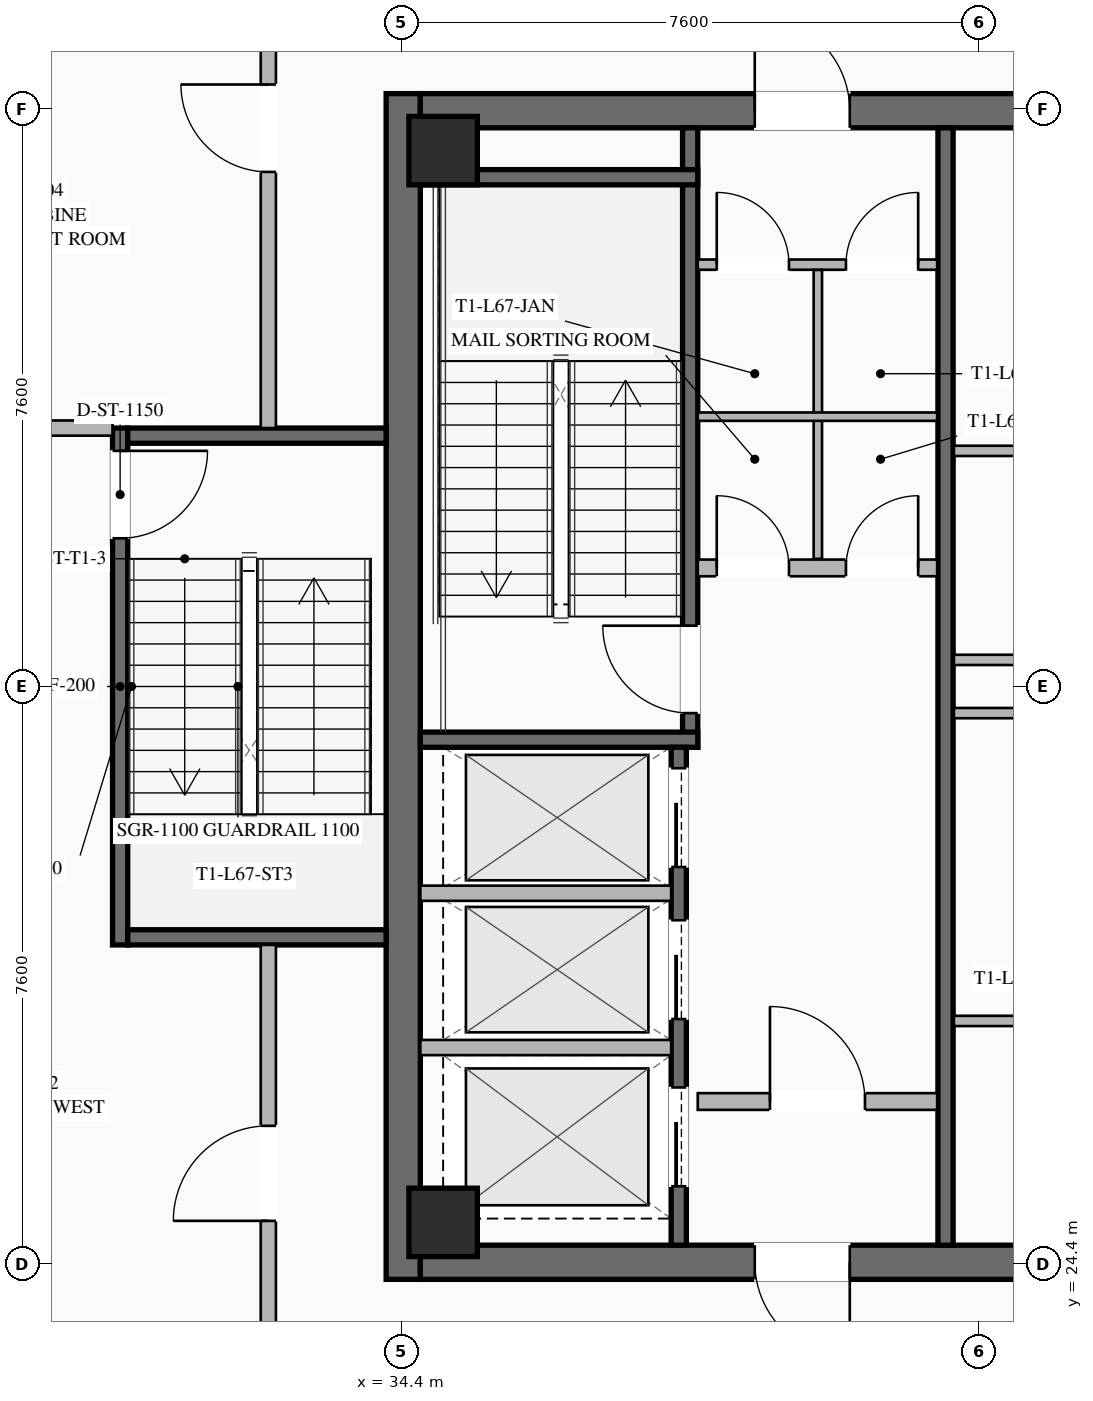
"""IFC4 building model, lengths in metres.
Left out: names, types, materials, properties, quantities, classifications, styles, units other than length and angle.
Written with IfcOpenShell. Run it as: python <this file> out.ifc"""

import sys

from ifc_helpers import new_model, si_unit, direction, frame, frame_2d, origin, origin_2d, place, context, subcontext, project, spatial, rectangle, hollow_rectangle, extrude, element, fill, save


model = new_model("IFC4")
c1 = context("Model", 3, precision=1e-05, world=origin(), true_north=direction((0.0, 1.0)))
c2 = subcontext(c1, "Body", "Model", "MODEL_VIEW")
j1 = project(units=[si_unit("LENGTHUNIT", "METRE"), si_unit("PLANEANGLEUNIT", "RADIAN")], contexts=[c1])
p1 = place(None, origin())
s1 = spatial("IfcSite", under=j1, at=p1, CompositionType="ELEMENT")
p2 = place(p1, origin())
s2 = spatial("IfcBuilding", under=s1, at=p2, CompositionType="ELEMENT")
p3 = place(p2, frame((0.0, 0.0, 246.8)))
s3 = spatial("IfcBuildingStorey", under=s2, at=p3, CompositionType="ELEMENT", Elevation=246.8)
p4 = place(p3, frame((34.425, 24.2, 0.0), z_axis=(0.0, 0.0, 1.0), x_axis=(0.0, 1.0, 0.0)))
e1 = element("IfcWall", 1, at=p4, inside=s3, PredefinedType="SHEAR", context=c2, shape_type="SweptSolid", body=[
    extrude(rectangle(XDim=15.6, YDim=0.45, at=frame_2d((7.8, 0.0))), origin(), (0.0, 0.0, 1.0), 4.6),
])
p5 = place(p3, frame((49.35, 24.425, 0.0), z_axis=(0.0, 0.0, 1.0), x_axis=(-1.0, 0.0, 0.0)))
e2 = element("IfcWall", 2, at=p5, inside=s3, PredefinedType="SHEAR", context=c2, shape_type="SweptSolid", body=[
    extrude(rectangle(XDim=14.7, YDim=0.45, at=frame_2d((7.35, 0.0))), origin(), (0.0, 0.0, 1.0), 4.6),
])
p6 = place(p5, frame((9.05, 0.0, 0.0)))
e3 = element("IfcOpeningElement", 3, at=p6, cuts=e2, PredefinedType="OPENING", context=c2, shape_type="SweptSolid", body=[
    extrude(rectangle(XDim=1.25, YDim=2.25, at=frame_2d((0.625, 1.125))), frame((0.0, 0.235, 0.0), z_axis=(0.0, -1.0, 0.0), x_axis=(1.0, 0.0, 0.0)), (0.0, 0.0, 1.0), 0.47),
])
p7 = place(p5, frame((4.0, 0.0, 0.0)))
e4 = element("IfcOpeningElement", 4, at=p7, cuts=e2, PredefinedType="OPENING", context=c2, shape_type="SweptSolid", body=[
    extrude(rectangle(XDim=1.25, YDim=2.25, at=frame_2d((0.625, 1.125))), frame((0.0, 0.235, 0.0), z_axis=(0.0, -1.0, 0.0), x_axis=(1.0, 0.0, 0.0)), (0.0, 0.0, 1.0), 0.47),
])
p8 = place(p3, frame((34.65, 39.575, 0.0), z_axis=(0.0, 0.0, 1.0), x_axis=(1.0, 0.0, 0.0)))
e5 = element("IfcWall", 5, at=p8, inside=s3, PredefinedType="SHEAR", context=c2, shape_type="SweptSolid", body=[
    extrude(rectangle(XDim=14.7, YDim=0.45, at=frame_2d((7.35, 0.0))), origin(), (0.0, 0.0, 1.0), 4.6),
])
p9 = place(p8, frame((4.4, 0.0, 0.0)))
e6 = element("IfcOpeningElement", 6, at=p9, cuts=e5, PredefinedType="OPENING", context=c2, shape_type="SweptSolid", body=[
    extrude(rectangle(XDim=1.25, YDim=2.25, at=frame_2d((0.625, 1.125))), frame((0.0, 0.235, 0.0), z_axis=(0.0, -1.0, 0.0), x_axis=(1.0, 0.0, 0.0)), (0.0, 0.0, 1.0), 0.47),
])
p10 = place(p8, frame((9.45, 0.0, 0.0)))
e7 = element("IfcOpeningElement", 7, at=p10, cuts=e5, PredefinedType="OPENING", context=c2, shape_type="SweptSolid", body=[
    extrude(rectangle(XDim=1.25, YDim=2.25, at=frame_2d((0.625, 1.125))), frame((0.0, 0.235, 0.0), z_axis=(0.0, -1.0, 0.0), x_axis=(1.0, 0.0, 0.0)), (0.0, 0.0, 1.0), 0.47),
])
for number, where, z_axis, x_axis in (
    (8, (34.95, 24.95, 0.0), (0.0, 0.0, 1.0), (1.0, 0.0, 0.0)),
    (9, (34.95, 39.05, 0.0), (0.0, 0.0, 1.0), (1.0, 0.0, 0.0)),
):
    element("IfcColumn", number, at=place(p3, frame(where, z_axis=z_axis, x_axis=x_axis)), inside=s3, PredefinedType="COLUMN", context=c2, shape_type="SweptSolid", body=[
        extrude(hollow_rectangle(XDim=0.9, YDim=0.9, WallThickness=0.04, at=origin_2d()), origin(), (0.0, 0.0, 1.0), 4.38),
    ])
p11 = place(p3, frame((38.2, 31.2, 0.0), z_axis=(0.0, 0.0, 1.0), x_axis=(0.0, 1.0, 0.0)))
e10 = element("IfcWall", 10, at=p11, inside=s3, PredefinedType="SHEAR", context=c2, shape_type="SweptSolid", body=[
    extrude(rectangle(XDim=8.15, YDim=0.2, at=frame_2d((4.075, 0.0))), origin(), (0.0, 0.0, 1.0), 4.38),
])
p12 = place(p11, frame((0.45, 0.0, 0.0)))
e11 = element("IfcOpeningElement", 11, at=p12, cuts=e10, PredefinedType="OPENING", context=c2, shape_type="SweptSolid", body=[
    extrude(rectangle(XDim=1.15, YDim=2.2, at=frame_2d((0.575, 1.1))), frame((0.0, 0.11, 0.0), z_axis=(0.0, -1.0, 0.0), x_axis=(1.0, 0.0, 0.0)), (0.0, 0.0, 1.0), 0.22),
])
for number, where, z_axis, x_axis in (
    (12, (34.65, 31.3, 0.0), (0.0, 0.0, 1.0), (1.0, 0.0, 0.0)),
    (13, (34.65, 38.7, 0.0), (0.0, 0.0, 1.0), (1.0, 0.0, 0.0)),
):
    element("IfcWall", number, at=place(p3, frame(where, z_axis=z_axis, x_axis=x_axis)), inside=s3, PredefinedType="SHEAR", context=c2, shape_type="SweptSolid", body=[
        extrude(rectangle(XDim=3.65, YDim=0.2, at=frame_2d((1.825, 0.0))), origin(), (0.0, 0.0, 1.0), 4.38),
    ])
p13 = place(p3, frame((41.56, 24.65, 0.0), z_axis=(0.0, 0.0, 1.0), x_axis=(0.0, 1.0, 0.0)))
e14 = element("IfcWall", 14, at=p13, inside=s3, PredefinedType="SHEAR", context=c2, shape_type="SweptSolid", body=[
    extrude(rectangle(XDim=14.7, YDim=0.2, at=frame_2d((7.35, 0.0))), origin(), (0.0, 0.0, 1.0), 4.38),
])
p14 = place(p3, frame((38.3, 33.56, 0.0), z_axis=(0.0, 0.0, 1.0), x_axis=(1.0, 0.0, 0.0)))
e15 = element("IfcWall", 15, at=p14, inside=s3, PredefinedType="SOLIDWALL", context=c2, shape_type="SweptSolid", body=[
    extrude(rectangle(XDim=3.15, YDim=0.22, at=frame_2d((1.575, 0.0))), origin(), (0.0, 0.0, 1.0), 3.491),
])
p15 = place(p14, frame((0.25, 0.0, 0.0)))
e16 = element("IfcOpeningElement", 16, at=p15, cuts=e15, PredefinedType="OPENING", context=c2, shape_type="SweptSolid", body=[
    extrude(rectangle(XDim=0.95, YDim=2.05, at=frame_2d((0.475, 1.025))), frame((0.0, 0.12, 0.0), z_axis=(0.0, -1.0, 0.0), x_axis=(1.0, 0.0, 0.0)), (0.0, 0.0, 1.0), 0.24),
])
p16 = place(p14, frame((1.95, 0.0, 0.0)))
e17 = element("IfcOpeningElement", 17, at=p16, cuts=e15, PredefinedType="OPENING", context=c2, shape_type="SweptSolid", body=[
    extrude(rectangle(XDim=0.95, YDim=2.05, at=frame_2d((0.475, 1.025))), frame((0.0, 0.12, 0.0), z_axis=(0.0, -1.0, 0.0), x_axis=(1.0, 0.0, 0.0)), (0.0, 0.0, 1.0), 0.24),
])
p17 = place(p3, frame((38.3, 26.54, 0.0), z_axis=(0.0, 0.0, 1.0), x_axis=(1.0, 0.0, 0.0)))
e18 = element("IfcWall", 18, at=p17, inside=s3, PredefinedType="SOLIDWALL", context=c2, shape_type="SweptSolid", body=[
    extrude(rectangle(XDim=3.15, YDim=0.22, at=frame_2d((1.575, 0.0))), origin(), (0.0, 0.0, 1.0), 3.491),
])
p18 = place(p17, frame((0.95, 0.0, 0.0)))
e19 = element("IfcOpeningElement", 19, at=p18, cuts=e18, PredefinedType="OPENING", context=c2, shape_type="SweptSolid", body=[
    extrude(rectangle(XDim=1.25, YDim=2.25, at=frame_2d((0.625, 1.125))), frame((0.0, 0.12, 0.0), z_axis=(0.0, -1.0, 0.0), x_axis=(1.0, 0.0, 0.0)), (0.0, 0.0, 1.0), 0.24),
])
p19 = place(p3, frame((38.05, 24.65, 0.0), z_axis=(0.0, 0.0, 1.0), x_axis=(0.0, 1.0, 0.0)))
e20 = element("IfcWall", 20, at=p19, inside=s3, PredefinedType="SHEAR", context=c2, shape_type="SweptSolid", body=[
    extrude(rectangle(XDim=6.55, YDim=0.2, at=frame_2d((3.275, 0.0))), origin(), (0.0, 0.0, 1.0), 4.38),
])
p20 = place(p19, frame((4.975, 0.0, 0.0)))
e21 = element("IfcOpeningElement", 21, at=p20, cuts=e20, PredefinedType="OPENING", context=c2, shape_type="SweptSolid", body=[
    extrude(rectangle(XDim=1.3, YDim=2.25, at=frame_2d((0.65, 1.125))), frame((0.0, 0.11, 0.0), z_axis=(0.0, -1.0, 0.0), x_axis=(1.0, 0.0, 0.0)), (0.0, 0.0, 1.0), 0.22),
])
p21 = place(p19, frame((2.975, 0.0, 0.0)))
e22 = element("IfcOpeningElement", 22, at=p21, cuts=e20, PredefinedType="OPENING", context=c2, shape_type="SweptSolid", body=[
    extrude(rectangle(XDim=1.3, YDim=2.25, at=frame_2d((0.65, 1.125))), frame((0.0, 0.11, 0.0), z_axis=(0.0, -1.0, 0.0), x_axis=(1.0, 0.0, 0.0)), (0.0, 0.0, 1.0), 0.22),
])
p22 = place(p19, frame((0.775, 0.0, 0.0)))
e23 = element("IfcOpeningElement", 23, at=p22, cuts=e20, PredefinedType="OPENING", context=c2, shape_type="SweptSolid", body=[
    extrude(rectangle(XDim=1.3, YDim=2.25, at=frame_2d((0.65, 1.125))), frame((0.0, 0.11, 0.0), z_axis=(0.0, -1.0, 0.0), x_axis=(1.0, 0.0, 0.0)), (0.0, 0.0, 1.0), 0.22),
])
for number, where, z_axis, x_axis in (
    (24, (34.65, 27.25, 0.0), (0.0, 0.0, 1.0), (1.0, 0.0, 0.0)),
    (25, (34.65, 29.28, 0.0), (0.0, 0.0, 1.0), (1.0, 0.0, 0.0)),
):
    element("IfcWall", number, at=place(p3, frame(where, z_axis=z_axis, x_axis=x_axis)), inside=s3, PredefinedType="SOLIDWALL", context=c2, shape_type="SweptSolid", body=[
        extrude(rectangle(XDim=3.3, YDim=0.2, at=frame_2d((1.65, 0.0))), origin(), (0.0, 0.0, 1.0), 4.38),
    ])
p23 = place(p3, frame((38.3, 37.55, 0.0), z_axis=(0.0, 0.0, 1.0), x_axis=(1.0, 0.0, 0.0)))
e26 = element("IfcWall", 26, at=p23, inside=s3, PredefinedType="PARTITIONING", context=c2, shape_type="SweptSolid", body=[
    extrude(rectangle(XDim=3.15, YDim=0.135, at=frame_2d((1.575, 0.0))), origin(), (0.0, 0.0, 1.0), 3.491),
])
p24 = place(p23, frame((0.25, 0.0, 0.0)))
e27 = element("IfcOpeningElement", 27, at=p24, cuts=e26, PredefinedType="OPENING", context=c2, shape_type="SweptSolid", body=[
    extrude(rectangle(XDim=0.95, YDim=2.05, at=frame_2d((0.475, 1.025))), frame((0.0, 0.077, 0.0), z_axis=(0.0, -1.0, 0.0), x_axis=(1.0, 0.0, 0.0)), (0.0, 0.0, 1.0), 0.155),
])
p25 = place(p23, frame((1.95, 0.0, 0.0)))
e28 = element("IfcOpeningElement", 28, at=p25, cuts=e26, PredefinedType="OPENING", context=c2, shape_type="SweptSolid", body=[
    extrude(rectangle(XDim=0.95, YDim=2.05, at=frame_2d((0.475, 1.025))), frame((0.0, 0.077, 0.0), z_axis=(0.0, -1.0, 0.0), x_axis=(1.0, 0.0, 0.0)), (0.0, 0.0, 1.0), 0.155),
])
p26 = place(p3, frame((39.88, 33.68, 0.0), z_axis=(0.0, 0.0, 1.0), x_axis=(0.0, 1.0, 0.0)))
e29 = element("IfcWall", 29, at=p26, inside=s3, PredefinedType="PARTITIONING", context=c2, shape_type="SweptSolid", body=[
    extrude(rectangle(XDim=3.8, YDim=0.11, at=frame_2d((1.9, 0.0))), origin(), (0.0, 0.0, 1.0), 3.491),
])
p27 = place(p3, frame((38.3, 35.55, 0.0), z_axis=(0.0, 0.0, 1.0), x_axis=(1.0, 0.0, 0.0)))
e30 = element("IfcWall", 30, at=p27, inside=s3, PredefinedType="PARTITIONING", context=c2, shape_type="SweptSolid", body=[
    extrude(rectangle(XDim=3.15, YDim=0.11, at=frame_2d((1.575, 0.0))), origin(), (0.0, 0.0, 1.0), 3.491),
])
for number, where, z_axis, x_axis in (
    (31, (41.67, 31.65, 0.0), (0.0, 0.0, 1.0), (1.0, 0.0, 0.0)),
    (32, (41.67, 27.6, 0.0), (0.0, 0.0, 1.0), (1.0, 0.0, 0.0)),
    (33, (41.67, 32.35, 0.0), (0.0, 0.0, 1.0), (1.0, 0.0, 0.0)),
    (34, (41.67, 35.1, 0.0), (0.0, 0.0, 1.0), (1.0, 0.0, 0.0)),
):
    element("IfcWall", number, at=place(p3, frame(where, z_axis=z_axis, x_axis=x_axis)), inside=s3, PredefinedType="PARTITIONING", context=c2, shape_type="SweptSolid", body=[
        extrude(rectangle(XDim=1.88, YDim=0.135, at=frame_2d((0.94, 0.0))), origin(), (0.0, 0.0, 1.0), 3.491),
    ])
p28 = place(p3, frame((30.7, 35.4, 0.0), z_axis=(0.0, 0.0, 1.0), x_axis=(0.0, -1.0, 0.0)))
e35 = element("IfcWall", 35, at=p28, inside=s3, PredefinedType="SHEAR", context=c2, shape_type="SweptSolid", body=[
    extrude(rectangle(XDim=6.8, YDim=0.2, at=frame_2d((3.4, 0.0))), origin(), (0.0, 0.0, 1.0), 4.38),
])
p29 = place(p28, frame((0.3, 0.0, 0.0)))
e36 = element("IfcOpeningElement", 36, at=p29, cuts=e35, PredefinedType="OPENING", context=c2, shape_type="SweptSolid", body=[
    extrude(rectangle(XDim=1.15, YDim=2.2, at=frame_2d((0.575, 1.1))), frame((0.0, 0.11, 0.0), z_axis=(0.0, -1.0, 0.0), x_axis=(1.0, 0.0, 0.0)), (0.0, 0.0, 1.0), 0.22),
])
for number, where, z_axis, x_axis in (
    (37, (34.2, 35.3, 0.0), (0.0, 0.0, 1.0), (-1.0, 0.0, 0.0)),
    (38, (30.8, 28.7, 0.0), (0.0, 0.0, 1.0), (1.0, 0.0, 0.0)),
):
    element("IfcWall", number, at=place(p3, frame(where, z_axis=z_axis, x_axis=x_axis)), inside=s3, PredefinedType="SHEAR", context=c2, shape_type="SweptSolid", body=[
        extrude(rectangle(XDim=3.4, YDim=0.2, at=frame_2d((1.7, 0.0))), origin(), (0.0, 0.0, 1.0), 4.38),
    ])
p30 = place(p3, frame((32.65, 22.77, 0.0), z_axis=(0.0, 0.0, 1.0), x_axis=(0.0, 1.0, 0.0)))
e39 = element("IfcWall", 39, at=p30, inside=s3, PredefinedType="SOLIDWALL", context=c2, shape_type="SweptSolid", body=[
    extrude(rectangle(XDim=5.83, YDim=0.2, at=frame_2d((2.915, 0.0))), origin(), (0.0, 0.0, 1.0), 3.491),
])
p31 = place(p30, frame((2.2, 0.0, 0.0)))
e40 = element("IfcOpeningElement", 40, at=p31, cuts=e39, PredefinedType="OPENING", context=c2, shape_type="SweptSolid", body=[
    extrude(rectangle(XDim=1.25, YDim=2.25, at=frame_2d((0.625, 1.125))), frame((0.0, 0.11, 0.0), z_axis=(0.0, -1.0, 0.0), x_axis=(1.0, 0.0, 0.0)), (0.0, 0.0, 1.0), 0.22),
])
p32 = place(p3, frame((32.65, 35.4, 0.0), z_axis=(0.0, 0.0, 1.0), x_axis=(0.0, 1.0, 0.0)))
e41 = element("IfcWall", 41, at=p32, inside=s3, PredefinedType="SOLIDWALL", context=c2, shape_type="SweptSolid", body=[
    extrude(rectangle(XDim=5.83, YDim=0.2, at=frame_2d((2.915, 0.0))), origin(), (0.0, 0.0, 1.0), 3.491),
])
p33 = place(p32, frame((3.37, 0.0, 0.0)))
e42 = element("IfcOpeningElement", 42, at=p33, cuts=e41, PredefinedType="OPENING", context=c2, shape_type="SweptSolid", body=[
    extrude(rectangle(XDim=1.15, YDim=2.2, at=frame_2d((0.575, 1.1))), frame((0.0, 0.11, 0.0), z_axis=(0.0, -1.0, 0.0), x_axis=(1.0, 0.0, 0.0)), (0.0, 0.0, 1.0), 0.22),
])
p34 = place(p3, frame((26.32, 35.4, 0.0), z_axis=(0.0, 0.0, 1.0), x_axis=(1.0, 0.0, 0.0)))
e43 = element("IfcWall", 43, at=p34, inside=s3, PredefinedType="SOLIDWALL", context=c2, shape_type="SweptSolid", body=[
    extrude(rectangle(XDim=4.28, YDim=0.2, at=frame_2d((2.14, 0.0))), origin(), (0.0, 0.0, 1.0), 3.491),
])
p35 = place(p9, origin())
e44 = element("IfcDoor", 44, at=p35, inside=s3, OperationType="SINGLE_SWING_LEFT", PredefinedType="DOOR", context=c2, shape_type="SweptSolid", body=[
    extrude(rectangle(XDim=1.25, YDim=2.25, at=frame_2d((0.625, 1.125))), frame((0.0, 0.025, 0.0), z_axis=(0.0, -1.0, 0.0), x_axis=(1.0, 0.0, 0.0)), (0.0, 0.0, 1.0), 0.05),
])
fill(e6, e44)
p36 = place(p6, origin())
e45 = element("IfcDoor", 45, at=p36, inside=s3, OperationType="SINGLE_SWING_LEFT", PredefinedType="DOOR", context=c2, shape_type="SweptSolid", body=[
    extrude(rectangle(XDim=1.25, YDim=2.25, at=frame_2d((0.625, 1.125))), frame((0.0, 0.025, 0.0), z_axis=(0.0, -1.0, 0.0), x_axis=(1.0, 0.0, 0.0)), (0.0, 0.0, 1.0), 0.05),
])
fill(e3, e45)
p37 = place(p12, origin())
e46 = element("IfcDoor", 46, at=p37, inside=s3, OperationType="SINGLE_SWING_RIGHT", PredefinedType="DOOR", context=c2, shape_type="SweptSolid", body=[
    extrude(rectangle(XDim=1.15, YDim=2.2, at=frame_2d((0.575, 1.1))), frame((0.0, 0.025, 0.0), z_axis=(0.0, -1.0, 0.0), x_axis=(1.0, 0.0, 0.0)), (0.0, 0.0, 1.0), 0.05),
])
fill(e11, e46)
p38 = place(p18, origin())
e47 = element("IfcDoor", 47, at=p38, inside=s3, OperationType="SINGLE_SWING_LEFT", PredefinedType="DOOR", context=c2, shape_type="SweptSolid", body=[
    extrude(rectangle(XDim=1.25, YDim=2.25, at=frame_2d((0.625, 1.125))), frame((0.0, 0.025, 0.0), z_axis=(0.0, -1.0, 0.0), x_axis=(1.0, 0.0, 0.0)), (0.0, 0.0, 1.0), 0.05),
])
fill(e19, e47)
p39 = place(p24, origin())
e48 = element("IfcDoor", 48, at=p39, inside=s3, OperationType="SINGLE_SWING_LEFT", PredefinedType="DOOR", context=c2, shape_type="SweptSolid", body=[
    extrude(rectangle(XDim=0.95, YDim=2.05, at=frame_2d((0.475, 1.025))), frame((0.0, 0.025, 0.0), z_axis=(0.0, -1.0, 0.0), x_axis=(1.0, 0.0, 0.0)), (0.0, 0.0, 1.0), 0.05),
])
fill(e27, e48)
p40 = place(p25, origin())
e49 = element("IfcDoor", 49, at=p40, inside=s3, OperationType="SINGLE_SWING_RIGHT", PredefinedType="DOOR", context=c2, shape_type="SweptSolid", body=[
    extrude(rectangle(XDim=0.95, YDim=2.05, at=frame_2d((0.475, 1.025))), frame((0.0, 0.025, 0.0), z_axis=(0.0, -1.0, 0.0), x_axis=(1.0, 0.0, 0.0)), (0.0, 0.0, 1.0), 0.05),
])
fill(e28, e49)
p41 = place(p15, origin())
e50 = element("IfcDoor", 50, at=p41, inside=s3, OperationType="SINGLE_SWING_LEFT", PredefinedType="DOOR", context=c2, shape_type="SweptSolid", body=[
    extrude(rectangle(XDim=0.95, YDim=2.05, at=frame_2d((0.475, 1.025))), frame((0.0, 0.025, 0.0), z_axis=(0.0, -1.0, 0.0), x_axis=(1.0, 0.0, 0.0)), (0.0, 0.0, 1.0), 0.05),
])
fill(e16, e50)
p42 = place(p16, origin())
e51 = element("IfcDoor", 51, at=p42, inside=s3, OperationType="SINGLE_SWING_RIGHT", PredefinedType="DOOR", context=c2, shape_type="SweptSolid", body=[
    extrude(rectangle(XDim=0.95, YDim=2.05, at=frame_2d((0.475, 1.025))), frame((0.0, 0.025, 0.0), z_axis=(0.0, -1.0, 0.0), x_axis=(1.0, 0.0, 0.0)), (0.0, 0.0, 1.0), 0.05),
])
fill(e17, e51)
p43 = place(p29, origin())
e52 = element("IfcDoor", 52, at=p43, inside=s3, OperationType="SINGLE_SWING_LEFT", PredefinedType="DOOR", context=c2, shape_type="SweptSolid", body=[
    extrude(rectangle(XDim=1.15, YDim=2.2, at=frame_2d((0.575, 1.1))), frame((0.0, 0.025, 0.0), z_axis=(0.0, -1.0, 0.0), x_axis=(1.0, 0.0, 0.0)), (0.0, 0.0, 1.0), 0.05),
])
fill(e36, e52)
p44 = place(p31, origin())
e53 = element("IfcDoor", 53, at=p44, inside=s3, OperationType="SINGLE_SWING_LEFT", PredefinedType="DOOR", context=c2, shape_type="SweptSolid", body=[
    extrude(rectangle(XDim=1.25, YDim=2.25, at=frame_2d((0.625, 1.125))), frame((0.0, 0.025, 0.0), z_axis=(0.0, -1.0, 0.0), x_axis=(1.0, 0.0, 0.0)), (0.0, 0.0, 1.0), 0.05),
])
fill(e40, e53)
p45 = place(p33, origin())
e54 = element("IfcDoor", 54, at=p45, inside=s3, OperationType="SINGLE_SWING_RIGHT", PredefinedType="DOOR", context=c2, shape_type="SweptSolid", body=[
    extrude(rectangle(XDim=1.15, YDim=2.2, at=frame_2d((0.575, 1.1))), frame((0.0, 0.025, 0.0), z_axis=(0.0, -1.0, 0.0), x_axis=(1.0, 0.0, 0.0)), (0.0, 0.0, 1.0), 0.05),
])
fill(e42, e54)
p46 = place(p20, origin())
e55 = element("IfcDoor", 55, at=p46, inside=s3, OperationType="SLIDING_TO_LEFT", PredefinedType="DOOR", context=c2, shape_type="SweptSolid", body=[
    extrude(rectangle(XDim=1.3, YDim=2.25, at=frame_2d((0.65, 1.125))), frame((0.0, 0.025, 0.0), z_axis=(0.0, -1.0, 0.0), x_axis=(1.0, 0.0, 0.0)), (0.0, 0.0, 1.0), 0.05),
])
fill(e21, e55)
p47 = place(p21, origin())
e56 = element("IfcDoor", 56, at=p47, inside=s3, OperationType="SLIDING_TO_LEFT", PredefinedType="DOOR", context=c2, shape_type="SweptSolid", body=[
    extrude(rectangle(XDim=1.3, YDim=2.25, at=frame_2d((0.65, 1.125))), frame((0.0, 0.025, 0.0), z_axis=(0.0, -1.0, 0.0), x_axis=(1.0, 0.0, 0.0)), (0.0, 0.0, 1.0), 0.05),
])
fill(e22, e56)
p48 = place(p22, origin())
e57 = element("IfcDoor", 57, at=p48, inside=s3, OperationType="SLIDING_TO_LEFT", PredefinedType="DOOR", context=c2, shape_type="SweptSolid", body=[
    extrude(rectangle(XDim=1.3, YDim=2.25, at=frame_2d((0.65, 1.125))), frame((0.0, 0.025, 0.0), z_axis=(0.0, -1.0, 0.0), x_axis=(1.0, 0.0, 0.0)), (0.0, 0.0, 1.0), 0.05),
])
fill(e23, e57)
save(model, sys.argv[1])
